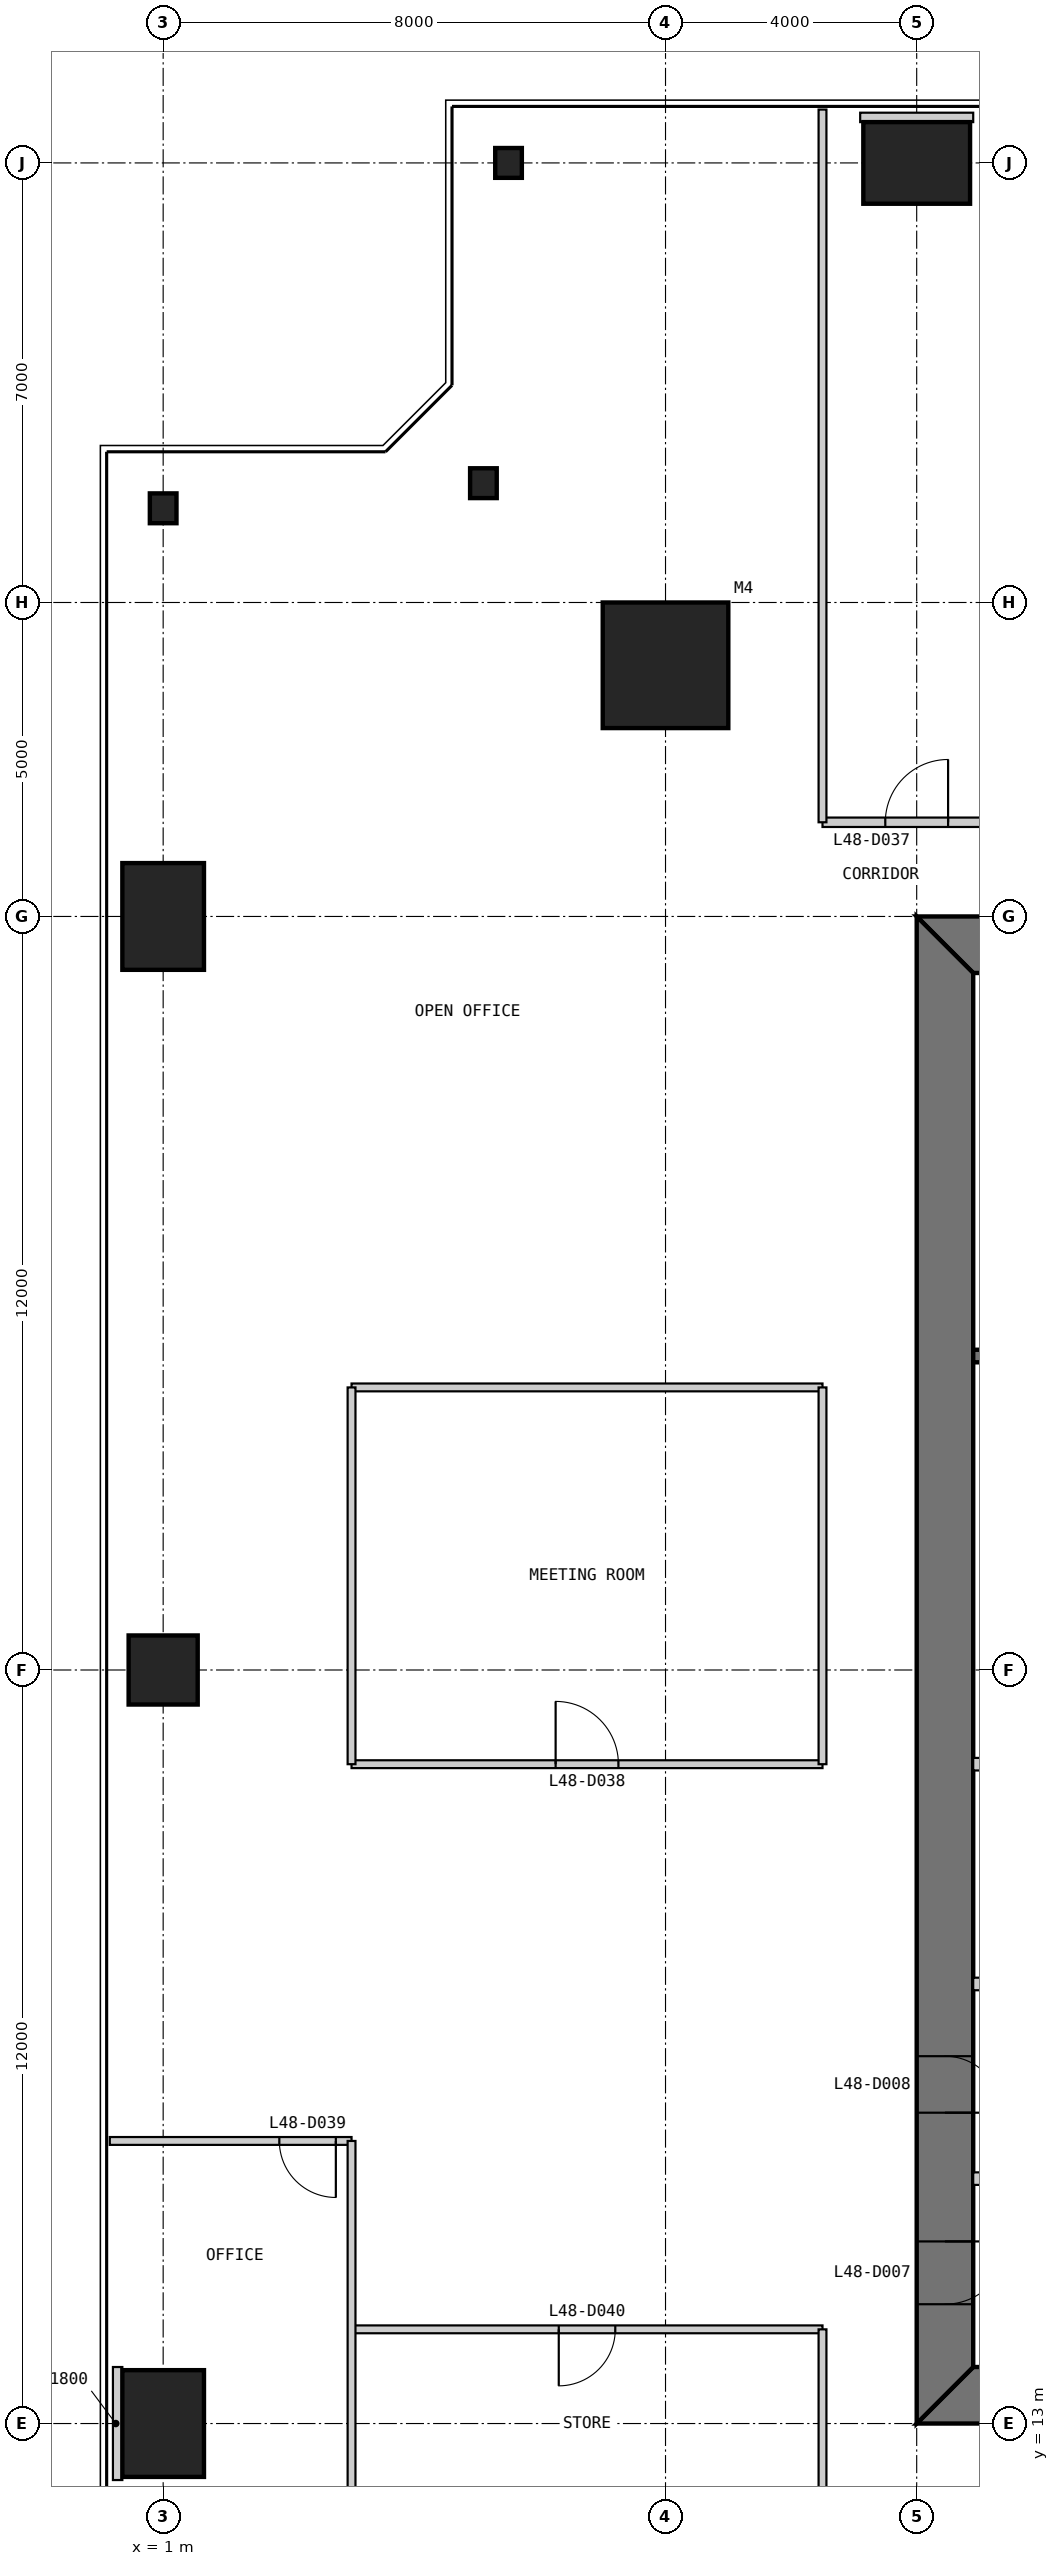
"""IFC4 building model, lengths in metres.
Left out: names, types, materials, properties, quantities, classifications, styles, units other than length and angle.
Written with IfcOpenShell. Run it as: python <this file> out.ifc"""

import sys

from ifc_helpers import new_model, si_unit, direction, frame, frame_2d, origin, origin_2d, place, context, subcontext, project, spatial, polyline, rectangle, i_section, outline, extrude, element, fill, save


model = new_model("IFC4")
c1 = context("Model", 3, precision=1e-05, world=origin(), true_north=direction((0.0, 1.0)))
c2 = subcontext(c1, "Body", "Model", "MODEL_VIEW")
j1 = project(units=[si_unit("LENGTHUNIT", "METRE"), si_unit("PLANEANGLEUNIT", "RADIAN")], contexts=[c1])
p1 = place(None, origin())
s1 = spatial("IfcSite", under=j1, at=p1, CompositionType="ELEMENT")
p2 = place(p1, origin())
s2 = spatial("IfcBuilding", under=s1, at=p2, CompositionType="ELEMENT")
p3 = place(p2, frame((0.0, 0.0, 205.8)))
s3 = spatial("IfcBuildingStorey", under=s2, at=p3, CompositionType="ELEMENT", Elevation=205.8)
p4 = place(p3, frame((9.0, 41.0, 0.0), z_axis=(0.0, 0.0, 1.0), x_axis=(1.0, 0.0, 0.0)))
e1 = element("IfcColumn", 1, at=p4, inside=s3, PredefinedType="COLUMN", context=c2, shape_type="SweptSolid", body=[
    extrude(rectangle(XDim=2.0, YDim=2.0, at=origin_2d()), origin(), (0.0, 0.0, 1.0), 4.0),
])
p5 = place(p3, frame((13.0, 49.0, 0.0), z_axis=(0.0, 0.0, 1.0), x_axis=(1.0, 0.0, 0.0)))
e2 = element("IfcColumn", 2, at=p5, inside=s3, PredefinedType="COLUMN", context=c2, shape_type="SweptSolid", body=[
    extrude(rectangle(XDim=1.7, YDim=1.3, at=origin_2d()), origin(), (0.0, 0.0, 1.0), 4.0),
])
for number, where, z_axis, x_axis in (
    (3, (6.5, 49.0, 0.0), (0.0, 0.0, 1.0), (1.0, 0.0, 0.0)),
    (4, (6.1, 43.9, 0.0), (0.0, 0.0, 1.0), (1.0, 0.0, 0.0)),
    (5, (1.0, 43.5, 0.0), (0.0, 0.0, 1.0), (1.0, 0.0, 0.0)),
):
    element("IfcColumn", number, at=place(p3, frame(where, z_axis=z_axis, x_axis=x_axis)), inside=s3, PredefinedType="COLUMN", context=c2, shape_type="SweptSolid", body=[
        extrude(i_section(OverallWidth=0.424, OverallDepth=0.475, WebThickness=0.048, FlangeThickness=0.077, at=origin_2d()), origin(), (0.0, 0.0, 1.0), 4.0),
    ])
p6 = place(p3, frame((1.0, 37.0, 0.0), z_axis=(0.0, 0.0, 1.0), x_axis=(1.0, 0.0, 0.0)))
e6 = element("IfcColumn", 6, at=p6, inside=s3, PredefinedType="COLUMN", context=c2, shape_type="SweptSolid", body=[
    extrude(rectangle(XDim=1.3, YDim=1.7, at=origin_2d()), origin(), (0.0, 0.0, 1.0), 4.0),
])
p7 = place(p3, frame((1.0, 25.0, 0.0), z_axis=(0.0, 0.0, 1.0), x_axis=(1.0, 0.0, 0.0)))
e7 = element("IfcColumn", 7, at=p7, inside=s3, PredefinedType="COLUMN", context=c2, shape_type="SweptSolid", body=[
    extrude(rectangle(XDim=1.1, YDim=1.1, at=origin_2d()), origin(), (0.0, 0.0, 1.0), 4.0),
])
p8 = place(p3, frame((1.0, 13.0, 0.0), z_axis=(0.0, 0.0, 1.0), x_axis=(1.0, 0.0, 0.0)))
e8 = element("IfcColumn", 8, at=p8, inside=s3, PredefinedType="COLUMN", context=c2, shape_type="SweptSolid", body=[
    extrude(rectangle(XDim=1.3, YDim=1.7, at=origin_2d()), origin(), (0.0, 0.0, 1.0), 4.0),
])
p9 = place(p3, frame((13.0, 13.45, 0.0), z_axis=(0.0, 0.0, 1.0), x_axis=(1.0, 0.0, 0.0)))
e9 = element("IfcWall", 9, at=p9, inside=s3, PredefinedType="SHEAR", context=c2, shape_type="SweptSolid", body=[
    extrude(outline(polyline([(0.0, -0.45), (24.0, -0.45), (23.1, 0.45), (0.9, 0.45), (0.0, -0.45)])), origin(), (0.0, 0.0, 1.0), 4.0),
])
p10 = place(p9, frame((4.9, 0.0, 0.0)))
e10 = element("IfcOpeningElement", 10, at=p10, cuts=e9, PredefinedType="OPENING", context=c2, shape_type="SweptSolid", body=[
    extrude(rectangle(XDim=1.0, YDim=2.2, at=frame_2d((0.5, 1.1))), frame((0.0, 0.46, 0.0), z_axis=(0.0, -1.0, 0.0), x_axis=(1.0, 0.0, 0.0)), (0.0, 0.0, 1.0), 0.92),
])
p11 = place(p9, frame((8.9, 0.0, 0.0)))
e11 = element("IfcOpeningElement", 11, at=p11, cuts=e9, PredefinedType="OPENING", context=c2, shape_type="SweptSolid", body=[
    extrude(rectangle(XDim=1.1, YDim=2.2, at=frame_2d((0.55, 1.1))), frame((0.0, 0.46, 0.0), z_axis=(0.0, -1.0, 0.0), x_axis=(1.0, 0.0, 0.0)), (0.0, 0.0, 1.0), 0.92),
])
p12 = place(p9, frame((15.05, 0.0, 0.0)))
e12 = element("IfcOpeningElement", 12, at=p12, cuts=e9, PredefinedType="OPENING", context=c2, shape_type="SweptSolid", body=[
    extrude(rectangle(XDim=0.9, YDim=2.2, at=frame_2d((0.45, 1.1))), frame((0.0, 0.46, 0.0), z_axis=(0.0, -1.0, 0.0), x_axis=(1.0, 0.0, 0.0)), (0.0, 0.0, 1.0), 0.92),
])
p13 = place(p9, frame((17.9, 0.0, 0.0)))
e13 = element("IfcOpeningElement", 13, at=p13, cuts=e9, PredefinedType="OPENING", context=c2, shape_type="SweptSolid", body=[
    extrude(rectangle(XDim=1.0, YDim=2.2, at=frame_2d((0.5, 1.1))), frame((0.0, 0.46, 0.0), z_axis=(0.0, -1.0, 0.0), x_axis=(1.0, 0.0, 0.0)), (0.0, 0.0, 1.0), 0.92),
])
p14 = place(p9, frame((21.4, 0.0, 0.0)))
e14 = element("IfcOpeningElement", 14, at=p14, cuts=e9, PredefinedType="OPENING", context=c2, shape_type="SweptSolid", body=[
    extrude(rectangle(XDim=1.0, YDim=2.2, at=frame_2d((0.5, 1.1))), frame((0.0, 0.46, 0.0), z_axis=(0.0, -1.0, 0.0), x_axis=(1.0, 0.0, 0.0)), (0.0, 0.0, 1.0), 0.92),
])
p15 = place(p3, frame((37.0, 36.55, 0.0), z_axis=(0.0, 0.0, 1.0), x_axis=(-1.0, 0.0, 0.0)))
e15 = element("IfcWall", 15, at=p15, inside=s3, PredefinedType="SHEAR", context=c2, shape_type="SweptSolid", body=[
    extrude(outline(polyline([(0.0, -0.45), (24.0, -0.45), (23.1, 0.45), (0.9, 0.45), (0.0, -0.45)])), origin(), (0.0, 0.0, 1.0), 4.0),
])
p16 = place(p15, frame((4.9, 0.0, 0.0)))
e16 = element("IfcOpeningElement", 16, at=p16, cuts=e15, PredefinedType="OPENING", context=c2, shape_type="SweptSolid", body=[
    extrude(rectangle(XDim=1.0, YDim=2.2, at=frame_2d((0.5, 1.1))), frame((0.0, 0.46, 0.0), z_axis=(0.0, -1.0, 0.0), x_axis=(1.0, 0.0, 0.0)), (0.0, 0.0, 1.0), 0.92),
])
p17 = place(p15, frame((8.9, 0.0, 0.0)))
e17 = element("IfcOpeningElement", 17, at=p17, cuts=e15, PredefinedType="OPENING", context=c2, shape_type="SweptSolid", body=[
    extrude(rectangle(XDim=1.1, YDim=2.2, at=frame_2d((0.55, 1.1))), frame((0.0, 0.46, 0.0), z_axis=(0.0, -1.0, 0.0), x_axis=(1.0, 0.0, 0.0)), (0.0, 0.0, 1.0), 0.92),
])
p18 = place(p15, frame((15.05, 0.0, 0.0)))
e18 = element("IfcOpeningElement", 18, at=p18, cuts=e15, PredefinedType="OPENING", context=c2, shape_type="SweptSolid", body=[
    extrude(rectangle(XDim=0.9, YDim=2.2, at=frame_2d((0.45, 1.1))), frame((0.0, 0.46, 0.0), z_axis=(0.0, -1.0, 0.0), x_axis=(1.0, 0.0, 0.0)), (0.0, 0.0, 1.0), 0.92),
])
p19 = place(p15, frame((17.9, 0.0, 0.0)))
e19 = element("IfcOpeningElement", 19, at=p19, cuts=e15, PredefinedType="OPENING", context=c2, shape_type="SweptSolid", body=[
    extrude(rectangle(XDim=1.0, YDim=2.2, at=frame_2d((0.5, 1.1))), frame((0.0, 0.46, 0.0), z_axis=(0.0, -1.0, 0.0), x_axis=(1.0, 0.0, 0.0)), (0.0, 0.0, 1.0), 0.92),
])
p20 = place(p15, frame((21.4, 0.0, 0.0)))
e20 = element("IfcOpeningElement", 20, at=p20, cuts=e15, PredefinedType="OPENING", context=c2, shape_type="SweptSolid", body=[
    extrude(rectangle(XDim=1.0, YDim=2.2, at=frame_2d((0.5, 1.1))), frame((0.0, 0.46, 0.0), z_axis=(0.0, -1.0, 0.0), x_axis=(1.0, 0.0, 0.0)), (0.0, 0.0, 1.0), 0.92),
])
p21 = place(p3, frame((13.45, 36.1, 0.0), z_axis=(0.0, 0.0, 1.0), x_axis=(0.0, -1.0, 0.0)))
e21 = element("IfcWall", 21, at=p21, inside=s3, PredefinedType="SHEAR", context=c2, shape_type="SweptSolid", body=[
    extrude(outline(polyline([(-0.9, -0.45), (23.1, -0.45), (22.2, 0.45), (0.0, 0.45), (-0.9, -0.45)])), origin(), (0.0, 0.0, 1.0), 4.0),
])
p22 = place(p21, frame((20.2, 0.0, 0.0)))
e22 = element("IfcOpeningElement", 22, at=p22, cuts=e21, PredefinedType="OPENING", context=c2, shape_type="SweptSolid", body=[
    extrude(rectangle(XDim=1.0, YDim=2.2, at=frame_2d((0.5, 1.1))), frame((0.0, 0.46, 0.0), z_axis=(0.0, -1.0, 0.0), x_axis=(1.0, 0.0, 0.0)), (0.0, 0.0, 1.0), 0.92),
])
p23 = place(p21, frame((17.25, 0.0, 0.0)))
e23 = element("IfcOpeningElement", 23, at=p23, cuts=e21, PredefinedType="OPENING", context=c2, shape_type="SweptSolid", body=[
    extrude(rectangle(XDim=0.9, YDim=2.2, at=frame_2d((0.45, 1.1))), frame((0.0, 0.46, 0.0), z_axis=(0.0, -1.0, 0.0), x_axis=(1.0, 0.0, 0.0)), (0.0, 0.0, 1.0), 0.92),
])
for number, where, z_axis, x_axis in (
    (24, (13.9, 16.9, 0.0), (0.0, 0.0, 1.0), (1.0, 0.0, 0.0)),
    (25, (13.9, 20.0, 0.0), (0.0, 0.0, 1.0), (1.0, 0.0, 0.0)),
    (26, (13.9, 23.5, 0.0), (0.0, 0.0, 1.0), (1.0, 0.0, 0.0)),
):
    element("IfcWall", number, at=place(p3, frame(where, z_axis=z_axis, x_axis=x_axis)), inside=s3, PredefinedType="PARTITIONING", context=c2, shape_type="SweptSolid", body=[
        extrude(rectangle(XDim=2.8, YDim=0.2, at=frame_2d((1.4, 0.0))), origin(), (0.0, 0.0, 1.0), 3.8),
    ])
p24 = place(p3, frame((29.7, 30.0, 0.0), z_axis=(0.0, 0.0, 1.0), x_axis=(-1.0, 0.0, 0.0)))
e27 = element("IfcWall", 27, at=p24, inside=s3, PredefinedType="SOLIDWALL", context=c2, shape_type="SweptSolid", body=[
    extrude(rectangle(XDim=15.8, YDim=0.2, at=frame_2d((7.9, 0.0))), origin(), (0.0, 0.0, 1.0), 3.8),
])
p25 = place(p3, frame((38.5, 38.5, 0.0), z_axis=(0.0, 0.0, 1.0), x_axis=(-1.0, 0.0, 0.0)))
e28 = element("IfcWall", 28, at=p25, inside=s3, PredefinedType="PARTITIONING", context=c2, shape_type="SweptSolid", body=[
    extrude(rectangle(XDim=27.0, YDim=0.15, at=frame_2d((13.5, 0.0))), origin(), (0.0, 0.0, 1.0), 3.85),
])
p26 = place(p25, frame((13.0, 0.0, 0.0)))
e29 = element("IfcOpeningElement", 29, at=p26, cuts=e28, PredefinedType="OPENING", context=c2, shape_type="SweptSolid", body=[
    extrude(rectangle(XDim=1.0, YDim=2.2, at=frame_2d((0.5, 1.1))), frame((0.0, 0.085, 0.0), z_axis=(0.0, -1.0, 0.0), x_axis=(1.0, 0.0, 0.0)), (0.0, 0.0, 1.0), 0.17),
])
p27 = place(p25, frame((4.0, 0.0, 0.0)))
e30 = element("IfcOpeningElement", 30, at=p27, cuts=e28, PredefinedType="OPENING", context=c2, shape_type="SweptSolid", body=[
    extrude(rectangle(XDim=1.0, YDim=2.2, at=frame_2d((0.5, 1.1))), frame((0.0, 0.085, 0.0), z_axis=(0.0, -1.0, 0.0), x_axis=(1.0, 0.0, 0.0)), (0.0, 0.0, 1.0), 0.17),
])
p28 = place(p25, frame((22.0, 0.0, 0.0)))
e31 = element("IfcOpeningElement", 31, at=p28, cuts=e28, PredefinedType="OPENING", context=c2, shape_type="SweptSolid", body=[
    extrude(rectangle(XDim=1.0, YDim=2.2, at=frame_2d((0.5, 1.1))), frame((0.0, 0.085, 0.0), z_axis=(0.0, -1.0, 0.0), x_axis=(1.0, 0.0, 0.0)), (0.0, 0.0, 1.0), 0.17),
])
p29 = place(p25, frame((25.0, 0.0, 0.0)))
e32 = element("IfcOpeningElement", 32, at=p29, cuts=e28, PredefinedType="OPENING", context=c2, shape_type="SweptSolid", body=[
    extrude(rectangle(XDim=1.0, YDim=2.2, at=frame_2d((0.5, 1.1))), frame((0.0, 0.085, 0.0), z_axis=(0.0, -1.0, 0.0), x_axis=(1.0, 0.0, 0.0)), (0.0, 0.0, 1.0), 0.17),
])
p30 = place(p3, frame((11.5, 49.85, 0.0), z_axis=(0.0, 0.0, 1.0), x_axis=(0.0, -1.0, 0.0)))
e33 = element("IfcWall", 33, at=p30, inside=s3, PredefinedType="PARTITIONING", context=c2, shape_type="SweptSolid", body=[
    extrude(rectangle(XDim=11.35, YDim=0.125, at=frame_2d((5.675, 0.0))), origin(), (0.0, 0.0, 1.0), 3.85),
])
p31 = place(p3, frame((4.0, 29.5, 0.0), z_axis=(0.0, 0.0, 1.0), x_axis=(1.0, 0.0, 0.0)))
e34 = element("IfcWall", 34, at=p31, inside=s3, PredefinedType="PARTITIONING", context=c2, shape_type="SweptSolid", body=[
    extrude(rectangle(XDim=7.5, YDim=0.125, at=frame_2d((3.75, 0.0))), origin(), (0.0, 0.0, 1.0), 3.85),
])
p32 = place(p3, frame((4.0, 23.5, 0.0), z_axis=(0.0, 0.0, 1.0), x_axis=(1.0, 0.0, 0.0)))
e35 = element("IfcWall", 35, at=p32, inside=s3, PredefinedType="PARTITIONING", context=c2, shape_type="SweptSolid", body=[
    extrude(rectangle(XDim=7.5, YDim=0.125, at=frame_2d((3.75, 0.0))), origin(), (0.0, 0.0, 1.0), 3.85),
])
p33 = place(p32, frame((3.25, 0.0, 0.0)))
e36 = element("IfcOpeningElement", 36, at=p33, cuts=e35, PredefinedType="OPENING", context=c2, shape_type="SweptSolid", body=[
    extrude(rectangle(XDim=1.0, YDim=2.2, at=frame_2d((0.5, 1.1))), frame((0.0, 0.073, 0.0), z_axis=(0.0, -1.0, 0.0), x_axis=(1.0, 0.0, 0.0)), (0.0, 0.0, 1.0), 0.145),
])
p34 = place(p3, frame((0.15, 17.5, 0.0), z_axis=(0.0, 0.0, 1.0), x_axis=(1.0, 0.0, 0.0)))
e37 = element("IfcWall", 37, at=p34, inside=s3, PredefinedType="PARTITIONING", context=c2, shape_type="SweptSolid", body=[
    extrude(rectangle(XDim=3.85, YDim=0.125, at=frame_2d((1.925, 0.0))), origin(), (0.0, 0.0, 1.0), 3.85),
])
p35 = place(p34, frame((2.7, 0.0, 0.0)))
e38 = element("IfcOpeningElement", 38, at=p35, cuts=e37, PredefinedType="OPENING", context=c2, shape_type="SweptSolid", body=[
    extrude(rectangle(XDim=0.9, YDim=2.2, at=frame_2d((0.45, 1.1))), frame((0.0, 0.073, 0.0), z_axis=(0.0, -1.0, 0.0), x_axis=(1.0, 0.0, 0.0)), (0.0, 0.0, 1.0), 0.145),
])
p36 = place(p3, frame((4.0, 14.5, 0.0), z_axis=(0.0, 0.0, 1.0), x_axis=(1.0, 0.0, 0.0)))
e39 = element("IfcWall", 39, at=p36, inside=s3, PredefinedType="PARTITIONING", context=c2, shape_type="SweptSolid", body=[
    extrude(rectangle(XDim=7.5, YDim=0.125, at=frame_2d((3.75, 0.0))), origin(), (0.0, 0.0, 1.0), 3.85),
])
p37 = place(p36, frame((3.3, 0.0, 0.0)))
e40 = element("IfcOpeningElement", 40, at=p37, cuts=e39, PredefinedType="OPENING", context=c2, shape_type="SweptSolid", body=[
    extrude(rectangle(XDim=0.9, YDim=2.2, at=frame_2d((0.45, 1.1))), frame((0.0, 0.073, 0.0), z_axis=(0.0, -1.0, 0.0), x_axis=(1.0, 0.0, 0.0)), (0.0, 0.0, 1.0), 0.145),
])
for number, where, z_axis, x_axis in (
    (41, (4.0, 29.5, 0.0), (0.0, 0.0, 1.0), (0.0, -1.0, 0.0)),
    (42, (4.0, 17.5, 0.0), (0.0, 0.0, 1.0), (0.0, -1.0, 0.0)),
):
    element("IfcWall", number, at=place(p3, frame(where, z_axis=z_axis, x_axis=x_axis)), inside=s3, PredefinedType="PARTITIONING", context=c2, shape_type="SweptSolid", body=[
        extrude(rectangle(XDim=6.0, YDim=0.125, at=frame_2d((3.0, 0.0))), origin(), (0.0, 0.0, 1.0), 3.238),
    ])
p38 = place(p3, frame((11.5, 29.5, 0.0), z_axis=(0.0, 0.0, 1.0), x_axis=(0.0, -1.0, 0.0)))
e43 = element("IfcWall", 43, at=p38, inside=s3, PredefinedType="PARTITIONING", context=c2, shape_type="SweptSolid", body=[
    extrude(rectangle(XDim=6.0, YDim=0.125, at=frame_2d((3.0, 0.0))), origin(), (0.0, 0.0, 1.0), 3.85),
])
p39 = place(p3, frame((11.5, 14.5, 0.0), z_axis=(0.0, 0.0, 1.0), x_axis=(0.0, -1.0, 0.0)))
e44 = element("IfcWall", 44, at=p39, inside=s3, PredefinedType="PARTITIONING", context=c2, shape_type="SweptSolid", body=[
    extrude(rectangle(XDim=3.0, YDim=0.125, at=frame_2d((1.5, 0.0))), origin(), (0.0, 0.0, 1.0), 3.85),
])
for number, where, z_axis, x_axis in (
    (45, (13.0, 49.8, 0.0), (0.0, 0.0, 1.0), (0.0, -1.0, 0.0)),
    (46, (0.2, 13.0, 0.0), (0.0, 0.0, 1.0), (1.0, 0.0, 0.0)),
):
    element("IfcWall", number, at=place(p3, frame(where, z_axis=z_axis, x_axis=x_axis)), inside=s3, PredefinedType="PARTITIONING", context=c2, shape_type="SweptSolid", body=[
        extrude(rectangle(XDim=0.15, YDim=1.8, at=frame_2d((0.075, 0.0))), origin(), (0.0, 0.0, 1.0), 3.85),
    ])
p40 = place(p22, origin())
e47 = element("IfcDoor", 47, at=p40, inside=s3, OperationType="SINGLE_SWING_LEFT", PredefinedType="DOOR", context=c2, shape_type="SweptSolid", body=[
    extrude(rectangle(XDim=1.0, YDim=2.2, at=frame_2d((0.5, 1.1))), frame((0.0, 0.025, 0.0), z_axis=(0.0, -1.0, 0.0), x_axis=(1.0, 0.0, 0.0)), (0.0, 0.0, 1.0), 0.05),
    extrude(outline(polyline([(0.0, 0.0), (0.04, 0.0), (0.04, 2.16), (0.96, 2.16), (0.96, 0.0), (1.0, 0.0), (1.0, 2.2), (0.0, 2.2), (0.0, 0.0)])), frame((0.0, 0.3, 0.0), z_axis=(0.0, -1.0, 0.0), x_axis=(1.0, 0.0, 0.0)), (0.0, 0.0, 1.0), 0.6),
])
fill(e22, e47)
p41 = place(p23, origin())
e48 = element("IfcDoor", 48, at=p41, inside=s3, OperationType="SINGLE_SWING_RIGHT", PredefinedType="DOOR", context=c2, shape_type="SweptSolid", body=[
    extrude(rectangle(XDim=0.9, YDim=2.2, at=frame_2d((0.45, 1.1))), frame((0.0, 0.025, 0.0), z_axis=(0.0, -1.0, 0.0), x_axis=(1.0, 0.0, 0.0)), (0.0, 0.0, 1.0), 0.05),
    extrude(outline(polyline([(0.0, 0.0), (0.04, 0.0), (0.04, 2.16), (0.86, 2.16), (0.86, 0.0), (0.9, 0.0), (0.9, 2.2), (0.0, 2.2), (0.0, 0.0)])), frame((0.0, 0.3, 0.0), z_axis=(0.0, -1.0, 0.0), x_axis=(1.0, 0.0, 0.0)), (0.0, 0.0, 1.0), 0.6),
])
fill(e23, e48)
p42 = place(p29, frame((1.0, 0.0, 0.0), z_axis=(0.0, 0.0, 1.0), x_axis=(-1.0, 0.0, 0.0)))
e49 = element("IfcDoor", 49, at=p42, inside=s3, OperationType="SINGLE_SWING_RIGHT", PredefinedType="DOOR", context=c2, shape_type="SweptSolid", body=[
    extrude(rectangle(XDim=1.0, YDim=2.2, at=frame_2d((0.5, 1.1))), frame((0.0, 0.025, 0.0), z_axis=(0.0, -1.0, 0.0), x_axis=(1.0, 0.0, 0.0)), (0.0, 0.0, 1.0), 0.05),
])
fill(e32, e49)
p43 = place(p33, origin())
e50 = element("IfcDoor", 50, at=p43, inside=s3, OperationType="SINGLE_SWING_LEFT", PredefinedType="DOOR", context=c2, shape_type="SweptSolid", body=[
    extrude(rectangle(XDim=1.0, YDim=2.2, at=frame_2d((0.5, 1.1))), frame((0.0, 0.025, 0.0), z_axis=(0.0, -1.0, 0.0), x_axis=(1.0, 0.0, 0.0)), (0.0, 0.0, 1.0), 0.05),
])
fill(e36, e50)
p44 = place(p35, frame((0.9, 0.0, 0.0), z_axis=(0.0, 0.0, 1.0), x_axis=(-1.0, 0.0, 0.0)))
e51 = element("IfcDoor", 51, at=p44, inside=s3, OperationType="SINGLE_SWING_LEFT", PredefinedType="DOOR", context=c2, shape_type="SweptSolid", body=[
    extrude(rectangle(XDim=0.9, YDim=2.2, at=frame_2d((0.45, 1.1))), frame((0.0, 0.025, 0.0), z_axis=(0.0, -1.0, 0.0), x_axis=(1.0, 0.0, 0.0)), (0.0, 0.0, 1.0), 0.05),
])
fill(e38, e51)
p45 = place(p37, frame((0.9, 0.0, 0.0), z_axis=(0.0, 0.0, 1.0), x_axis=(-1.0, 0.0, 0.0)))
e52 = element("IfcDoor", 52, at=p45, inside=s3, OperationType="SINGLE_SWING_RIGHT", PredefinedType="DOOR", context=c2, shape_type="SweptSolid", body=[
    extrude(rectangle(XDim=0.9, YDim=2.2, at=frame_2d((0.45, 1.1))), frame((0.0, 0.025, 0.0), z_axis=(0.0, -1.0, 0.0), x_axis=(1.0, 0.0, 0.0)), (0.0, 0.0, 1.0), 0.05),
])
fill(e40, e52)
save(model, sys.argv[1])
